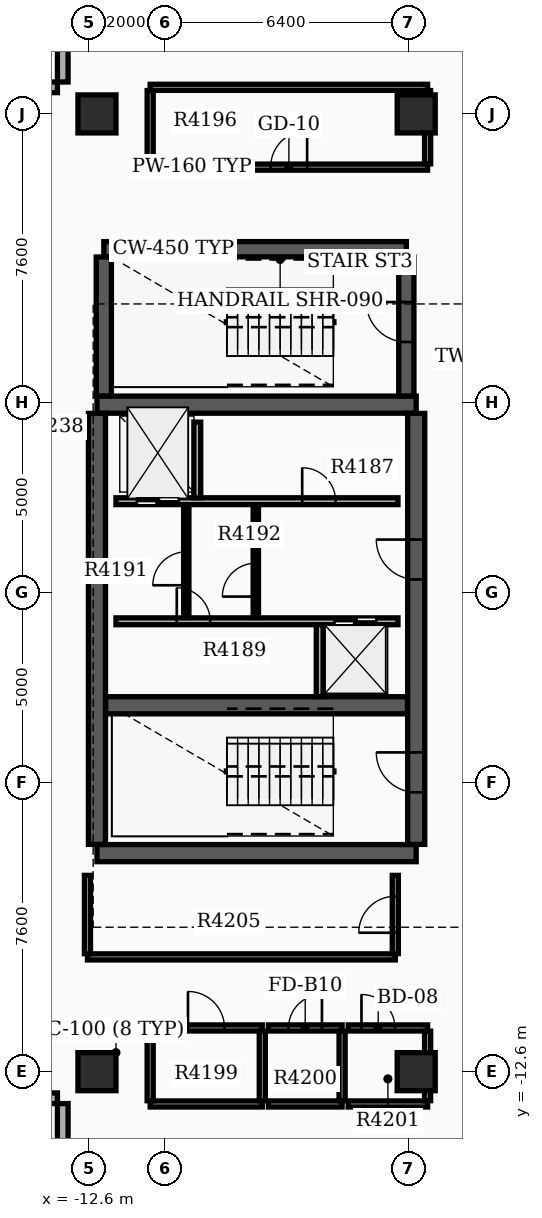
"""IFC4 building model, lengths in metres.
Left out: names, types, materials, properties, quantities, classifications, styles, units other than length and angle.
Written with IfcOpenShell. Run it as: python <this file> out.ifc"""

import sys

from ifc_helpers import new_model, si_unit, direction, frame, frame_2d, origin, origin_2d, place, context, subcontext, project, spatial, rectangle, extrude, element, fill, save


model = new_model("IFC4")
c1 = context("Model", 3, precision=1e-05, world=origin(), true_north=direction((0.0, 1.0)))
c2 = subcontext(c1, "Body", "Model", "MODEL_VIEW")
j1 = project(units=[si_unit("LENGTHUNIT", "METRE"), si_unit("PLANEANGLEUNIT", "RADIAN")], contexts=[c1])
p1 = place(None, origin())
s1 = spatial("IfcSite", under=j1, at=p1, CompositionType="ELEMENT")
p2 = place(p1, origin())
s2 = spatial("IfcBuilding", under=s1, at=p2, CompositionType="ELEMENT")
p3 = place(p2, frame((0.0, 0.0, 265.5)))
s3 = spatial("IfcBuildingStorey", under=s2, at=p3, CompositionType="ELEMENT", Elevation=265.5)
for number, where, z_axis, x_axis in (
    (1, (-12.4, -6.85, 0.0), (0.0, 0.0, 1.0), (1.0, 0.0, 0.0)),
    (2, (-12.4, 4.95, 0.0), (0.0, 0.0, 1.0), (1.0, 0.0, 0.0)),
):
    element("IfcWall", number, at=place(p3, frame(where, z_axis=z_axis, x_axis=x_axis)), inside=s3, PredefinedType="SHEAR", context=c2, shape_type="SweptSolid", body=[
        extrude(rectangle(XDim=8.4, YDim=0.45, at=frame_2d((4.2, 0.0))), origin(), (0.0, 0.0, 1.0), 3.7),
    ])
p4 = place(p3, frame((-12.4, -6.62, 0.0), z_axis=(0.0, 0.0, 1.0), x_axis=(0.0, 1.0, 0.0)))
e3 = element("IfcWall", 3, at=p4, inside=s3, PredefinedType="SHEAR", context=c2, shape_type="SweptSolid", body=[
    extrude(rectangle(XDim=11.34, YDim=0.45, at=frame_2d((5.67, 0.0))), origin(), (0.0, 0.0, 1.0), 3.7),
])
p5 = place(p3, frame((-4.0, -6.62, 0.0), z_axis=(0.0, 0.0, 1.0), x_axis=(0.0, 1.0, 0.0)))
e4 = element("IfcWall", 4, at=p5, inside=s3, PredefinedType="SHEAR", context=c2, shape_type="SweptSolid", body=[
    extrude(rectangle(XDim=11.34, YDim=0.45, at=frame_2d((5.67, 0.0))), origin(), (0.0, 0.0, 1.0), 3.7),
])
p6 = place(p5, frame((1.37, 0.0, 0.0)))
e5 = element("IfcOpeningElement", 5, at=p6, cuts=e4, PredefinedType="OPENING", context=c2, shape_type="SweptSolid", body=[
    extrude(rectangle(XDim=1.05, YDim=2.15, at=frame_2d((0.525, 1.075))), frame((0.0, 0.235, 0.0), z_axis=(0.0, -1.0, 0.0), x_axis=(1.0, 0.0, 0.0)), (0.0, 0.0, 1.0), 0.47),
])
p7 = place(p5, frame((6.97, 0.0, 0.0)))
e6 = element("IfcOpeningElement", 6, at=p7, cuts=e4, PredefinedType="OPENING", context=c2, shape_type="SweptSolid", body=[
    extrude(rectangle(XDim=1.05, YDim=2.15, at=frame_2d((0.525, 1.075))), frame((0.0, 0.235, 0.0), z_axis=(0.0, -1.0, 0.0), x_axis=(1.0, 0.0, 0.0)), (0.0, 0.0, 1.0), 0.47),
])
p8 = place(p3, frame((-12.17, -2.96, 0.0), z_axis=(0.0, 0.0, 1.0), x_axis=(1.0, 0.0, 0.0)))
e7 = element("IfcWall", 7, at=p8, inside=s3, PredefinedType="SHEAR", context=c2, shape_type="SweptSolid", body=[
    extrude(rectangle(XDim=7.94, YDim=0.45, at=frame_2d((3.97, 0.0))), origin(), (0.0, 0.0, 1.0), 3.7),
])
p9 = place(p3, frame((-12.22, 9.04, 0.0), z_axis=(0.0, 0.0, 1.0), x_axis=(1.0, 0.0, 0.0)))
e8 = element("IfcWall", 8, at=p9, inside=s3, PredefinedType="SHEAR", context=c2, shape_type="SweptSolid", body=[
    extrude(rectangle(XDim=7.96, YDim=0.4, at=frame_2d((3.98, 0.0))), origin(), (0.0, 0.0, 1.0), 3.7),
])
p10 = place(p3, frame((-12.22, 5.18, 0.0), z_axis=(0.0, 0.0, 1.0), x_axis=(0.0, 1.0, 0.0)))
e9 = element("IfcWall", 9, at=p10, inside=s3, PredefinedType="SHEAR", context=c2, shape_type="SweptSolid", body=[
    extrude(rectangle(XDim=3.655, YDim=0.4, at=frame_2d((1.828, 0.0))), origin(), (0.0, 0.0, 1.0), 3.7),
])
p11 = place(p3, frame((-4.26, 5.18, 0.0), z_axis=(0.0, 0.0, 1.0), x_axis=(0.0, 1.0, 0.0)))
e10 = element("IfcWall", 10, at=p11, inside=s3, PredefinedType="SHEAR", context=c2, shape_type="SweptSolid", body=[
    extrude(rectangle(XDim=3.655, YDim=0.4, at=frame_2d((1.828, 0.0))), origin(), (0.0, 0.0, 1.0), 3.7),
])
p12 = place(p11, frame((1.42, 0.0, 0.0)))
e11 = element("IfcOpeningElement", 11, at=p12, cuts=e10, PredefinedType="OPENING", context=c2, shape_type="SweptSolid", body=[
    extrude(rectangle(XDim=1.05, YDim=2.15, at=frame_2d((0.525, 1.075))), frame((0.0, 0.21, 0.0), z_axis=(0.0, -1.0, 0.0), x_axis=(1.0, 0.0, 0.0)), (0.0, 0.0, 1.0), 0.42),
])
for number, where, z_axis, x_axis in (
    (12, (-12.4, -12.6, 0.0), (0.0, 0.0, 1.0), (1.0, 0.0, 0.0)),
    (13, (-12.4, 12.6, 0.0), (0.0, 0.0, 1.0), (1.0, 0.0, 0.0)),
    (14, (-4.0, -12.6, 0.0), (0.0, 0.0, 1.0), (1.0, 0.0, 0.0)),
    (15, (-4.0, 12.6, 0.0), (0.0, 0.0, 1.0), (1.0, 0.0, 0.0)),
):
    element("IfcColumn", number, at=place(p3, frame(where, z_axis=z_axis, x_axis=x_axis)), inside=s3, PredefinedType="COLUMN", context=c2, shape_type="SweptSolid", body=[
        extrude(rectangle(XDim=1.0, YDim=1.0, at=origin_2d()), origin(), (0.0, 0.0, 1.0), 3.9),
    ])
p13 = place(p3, frame((-14.66, 13.3, 0.0), z_axis=(0.0, 0.0, 1.0), x_axis=(1.0, 0.0, 0.0)))
e16 = element("IfcWall", 16, at=p13, inside=s3, PredefinedType="STANDARD", context=c2, shape_type="SweptSolid", body=[
    extrude(rectangle(XDim=1.22, YDim=0.28, at=frame_2d((0.61, 0.0))), origin(), (0.0, 0.0, 1.0), 3.18),
])
p14 = place(p3, frame((-13.3, 13.44, 0.0), z_axis=(0.0, 0.0, 1.0), x_axis=(0.0, 1.0, 0.0)))
e17 = element("IfcWall", 17, at=p14, inside=s3, PredefinedType="STANDARD", context=c2, shape_type="SweptSolid", body=[
    extrude(rectangle(XDim=1.5, YDim=0.28, at=frame_2d((0.75, 0.0))), origin(), (0.0, 0.0, 1.0), 3.18),
])
p15 = place(p3, frame((-14.66, -13.3, 0.0), z_axis=(0.0, 0.0, 1.0), x_axis=(1.0, 0.0, 0.0)))
e18 = element("IfcWall", 18, at=p15, inside=s3, PredefinedType="STANDARD", context=c2, shape_type="SweptSolid", body=[
    extrude(rectangle(XDim=1.22, YDim=0.28, at=frame_2d((0.61, 0.0))), origin(), (0.0, 0.0, 1.0), 3.18),
])
p16 = place(p3, frame((-13.3, -13.44, 0.0), z_axis=(0.0, 0.0, 1.0), x_axis=(0.0, -1.0, 0.0)))
e19 = element("IfcWall", 19, at=p16, inside=s3, PredefinedType="STANDARD", context=c2, shape_type="SweptSolid", body=[
    extrude(rectangle(XDim=1.5, YDim=0.28, at=frame_2d((0.75, 0.0))), origin(), (0.0, 0.0, 1.0), 3.18),
])
p17 = place(p3, frame((-11.9, 2.41, 0.0), z_axis=(0.0, 0.0, 1.0), x_axis=(1.0, 0.0, 0.0)))
e20 = element("IfcWall", 20, at=p17, inside=s3, PredefinedType="SOLIDWALL", context=c2, shape_type="SweptSolid", body=[
    extrude(rectangle(XDim=7.42, YDim=0.18, at=frame_2d((3.71, 0.0))), origin(), (0.0, 0.0, 1.0), 3.17),
])
p18 = place(p17, frame((0.55, 0.0, 0.0)))
e21 = element("IfcOpeningElement", 21, at=p18, cuts=e20, PredefinedType="OPENING", context=c2, shape_type="SweptSolid", body=[
    extrude(rectangle(XDim=1.1, YDim=2.15, at=frame_2d((0.55, 1.075))), frame((0.0, 0.1, 0.0), z_axis=(0.0, -1.0, 0.0), x_axis=(1.0, 0.0, 0.0)), (0.0, 0.0, 1.0), 0.2),
])
p19 = place(p17, frame((4.9, 0.0, 0.0)))
e22 = element("IfcOpeningElement", 22, at=p19, cuts=e20, PredefinedType="OPENING", context=c2, shape_type="SweptSolid", body=[
    extrude(rectangle(XDim=0.88, YDim=2.1, at=frame_2d((0.44, 1.05))), frame((0.0, 0.1, 0.0), z_axis=(0.0, -1.0, 0.0), x_axis=(1.0, 0.0, 0.0)), (0.0, 0.0, 1.0), 0.2),
])
p20 = place(p3, frame((-11.9, -0.75, 0.0), z_axis=(0.0, 0.0, 1.0), x_axis=(1.0, 0.0, 0.0)))
e23 = element("IfcWall", 23, at=p20, inside=s3, PredefinedType="SOLIDWALL", context=c2, shape_type="SweptSolid", body=[
    extrude(rectangle(XDim=7.42, YDim=0.18, at=frame_2d((3.71, 0.0))), origin(), (0.0, 0.0, 1.0), 3.17),
])
p21 = place(p20, frame((5.75, 0.0, 0.0)))
e24 = element("IfcOpeningElement", 24, at=p21, cuts=e23, PredefinedType="OPENING", context=c2, shape_type="SweptSolid", body=[
    extrude(rectangle(XDim=1.1, YDim=2.15, at=frame_2d((0.55, 1.075))), frame((0.0, 0.1, 0.0), z_axis=(0.0, -1.0, 0.0), x_axis=(1.0, 0.0, 0.0)), (0.0, 0.0, 1.0), 0.2),
])
p22 = place(p20, frame((1.6, 0.0, 0.0)))
e25 = element("IfcOpeningElement", 25, at=p22, cuts=e23, PredefinedType="OPENING", context=c2, shape_type="SweptSolid", body=[
    extrude(rectangle(XDim=0.88, YDim=2.1, at=frame_2d((0.44, 1.05))), frame((0.0, 0.1, 0.0), z_axis=(0.0, -1.0, 0.0), x_axis=(1.0, 0.0, 0.0)), (0.0, 0.0, 1.0), 0.2),
])
p23 = place(p3, frame((-9.76, 2.5, 0.0), z_axis=(0.0, 0.0, 1.0), x_axis=(0.0, 1.0, 0.0)))
e26 = element("IfcWall", 26, at=p23, inside=s3, PredefinedType="SOLIDWALL", context=c2, shape_type="SweptSolid", body=[
    extrude(rectangle(XDim=1.99, YDim=0.18, at=frame_2d((0.995, 0.0))), origin(), (0.0, 0.0, 1.0), 3.17),
])
p24 = place(p3, frame((-6.54, -2.73, 0.0), z_axis=(0.0, 0.0, 1.0), x_axis=(0.0, 1.0, 0.0)))
e27 = element("IfcWall", 27, at=p24, inside=s3, PredefinedType="SOLIDWALL", context=c2, shape_type="SweptSolid", body=[
    extrude(rectangle(XDim=1.89, YDim=0.18, at=frame_2d((0.945, 0.0))), origin(), (0.0, 0.0, 1.0), 3.17),
])
p25 = place(p3, frame((-8.22, -0.65, 0.0), z_axis=(0.0, 0.0, 1.0), x_axis=(0.0, 1.0, 0.0)))
e28 = element("IfcWall", 28, at=p25, inside=s3, PredefinedType="SOLIDWALL", context=c2, shape_type="SweptSolid", body=[
    extrude(rectangle(XDim=2.96, YDim=0.14, at=frame_2d((1.48, 0.0))), origin(), (0.0, 0.0, 1.0), 3.17),
])
p26 = place(p25, frame((0.55, 0.0, 0.0)))
e29 = element("IfcOpeningElement", 29, at=p26, cuts=e28, PredefinedType="OPENING", context=c2, shape_type="SweptSolid", body=[
    extrude(rectangle(XDim=0.88, YDim=2.1, at=frame_2d((0.44, 1.05))), frame((0.0, 0.08, 0.0), z_axis=(0.0, -1.0, 0.0), x_axis=(1.0, 0.0, 0.0)), (0.0, 0.0, 1.0), 0.16),
])
p27 = place(p3, frame((-10.05, -0.652, 0.0), z_axis=(0.0, 0.0, 1.0), x_axis=(0.0, 1.0, 0.0)))
e30 = element("IfcWall", 30, at=p27, inside=s3, PredefinedType="PARTITIONING", context=c2, shape_type="SweptSolid", body=[
    extrude(rectangle(XDim=2.962, YDim=0.14, at=frame_2d((1.481, 0.0))), origin(), (0.0, 0.0, 1.0), 3.17),
])
p28 = place(p27, frame((0.85, 0.0, 0.0)))
e31 = element("IfcOpeningElement", 31, at=p28, cuts=e30, PredefinedType="OPENING", context=c2, shape_type="SweptSolid", body=[
    extrude(rectangle(XDim=0.88, YDim=2.1, at=frame_2d((0.44, 1.05))), frame((0.0, 0.08, 0.0), z_axis=(0.0, -1.0, 0.0), x_axis=(1.0, 0.0, 0.0)), (0.0, 0.0, 1.0), 0.16),
])
p29 = place(p3, frame((-11.0, 11.2, 0.0), z_axis=(0.0, 0.0, 1.0), x_axis=(1.0, 0.0, 0.0)))
e32 = element("IfcWall", 32, at=p29, inside=s3, PredefinedType="PARTITIONING", context=c2, shape_type="SweptSolid", body=[
    extrude(rectangle(XDim=7.3, YDim=0.16, at=frame_2d((3.65, 0.0))), origin(), (0.0, 0.0, 1.0), 3.17),
])
p30 = place(p29, frame((3.17, 0.0, 0.0)))
e33 = element("IfcOpeningElement", 33, at=p30, cuts=e32, PredefinedType="OPENING", context=c2, shape_type="SweptSolid", body=[
    extrude(rectangle(XDim=0.96, YDim=2.15, at=frame_2d((0.48, 1.075))), frame((0.0, 0.09, 0.0), z_axis=(0.0, -1.0, 0.0), x_axis=(1.0, 0.0, 0.0)), (0.0, 0.0, 1.0), 0.18),
])
p31 = place(p3, frame((-11.0, 13.3, 0.0), z_axis=(0.0, 0.0, 1.0), x_axis=(1.0, 0.0, 0.0)))
e34 = element("IfcWall", 34, at=p31, inside=s3, PredefinedType="PARTITIONING", context=c2, shape_type="SweptSolid", body=[
    extrude(rectangle(XDim=7.3, YDim=0.16, at=frame_2d((3.65, 0.0))), origin(), (0.0, 0.0, 1.0), 3.17),
])
for number, where, z_axis, x_axis in (
    (35, (-11.0, 11.285, 0.0), (0.0, 0.0, 1.0), (0.0, 1.0, 0.0)),
    (36, (-3.7, 11.285, 0.0), (0.0, 0.0, 1.0), (0.0, 1.0, 0.0)),
):
    element("IfcWall", number, at=place(p3, frame(where, z_axis=z_axis, x_axis=x_axis)), inside=s3, PredefinedType="PARTITIONING", context=c2, shape_type="SweptSolid", body=[
        extrude(rectangle(XDim=1.93, YDim=0.16, at=frame_2d((0.965, 0.0))), origin(), (0.0, 0.0, 1.0), 3.17),
    ])
p32 = place(p3, frame((-11.0, -13.45, 0.0), z_axis=(0.0, 0.0, 1.0), x_axis=(1.0, 0.0, 0.0)))
e37 = element("IfcWall", 37, at=p32, inside=s3, PredefinedType="PARTITIONING", context=c2, shape_type="SweptSolid", body=[
    extrude(rectangle(XDim=2.95, YDim=0.16, at=frame_2d((1.475, 0.0))), origin(), (0.0, 0.0, 1.0), 3.17),
])
p33 = place(p3, frame((-11.0, -11.45, 0.0), z_axis=(0.0, 0.0, 1.0), x_axis=(1.0, 0.0, 0.0)))
e38 = element("IfcWall", 38, at=p33, inside=s3, PredefinedType="PARTITIONING", context=c2, shape_type="SweptSolid", body=[
    extrude(rectangle(XDim=2.95, YDim=0.16, at=frame_2d((1.475, 0.0))), origin(), (0.0, 0.0, 1.0), 3.17),
])
p34 = place(p33, frame((0.995, 0.0, 0.0)))
e39 = element("IfcOpeningElement", 39, at=p34, cuts=e38, PredefinedType="OPENING", context=c2, shape_type="SweptSolid", body=[
    extrude(rectangle(XDim=0.96, YDim=2.15, at=frame_2d((0.48, 1.075))), frame((0.0, 0.09, 0.0), z_axis=(0.0, -1.0, 0.0), x_axis=(1.0, 0.0, 0.0)), (0.0, 0.0, 1.0), 0.18),
])
for number, where, z_axis, x_axis in (
    (40, (-11.0, -13.365, 0.0), (0.0, 0.0, 1.0), (0.0, 1.0, 0.0)),
    (41, (-8.05, -13.365, 0.0), (0.0, 0.0, 1.0), (0.0, 1.0, 0.0)),
):
    element("IfcWall", number, at=place(p3, frame(where, z_axis=z_axis, x_axis=x_axis)), inside=s3, PredefinedType="PARTITIONING", context=c2, shape_type="SweptSolid", body=[
        extrude(rectangle(XDim=1.83, YDim=0.16, at=frame_2d((0.915, 0.0))), origin(), (0.0, 0.0, 1.0), 3.17),
    ])
p35 = place(p3, frame((-7.89, -13.45, 0.0), z_axis=(0.0, 0.0, 1.0), x_axis=(1.0, 0.0, 0.0)))
e42 = element("IfcWall", 42, at=p35, inside=s3, PredefinedType="PARTITIONING", context=c2, shape_type="SweptSolid", body=[
    extrude(rectangle(XDim=1.94, YDim=0.16, at=frame_2d((0.97, 0.0))), origin(), (0.0, 0.0, 1.0), 3.17),
])
p36 = place(p3, frame((-7.89, -11.45, 0.0), z_axis=(0.0, 0.0, 1.0), x_axis=(1.0, 0.0, 0.0)))
e43 = element("IfcWall", 43, at=p36, inside=s3, PredefinedType="PARTITIONING", context=c2, shape_type="SweptSolid", body=[
    extrude(rectangle(XDim=1.94, YDim=0.16, at=frame_2d((0.97, 0.0))), origin(), (0.0, 0.0, 1.0), 3.17),
])
p37 = place(p36, frame((0.53, 0.0, 0.0)))
e44 = element("IfcOpeningElement", 44, at=p37, cuts=e43, PredefinedType="OPENING", context=c2, shape_type="SweptSolid", body=[
    extrude(rectangle(XDim=0.88, YDim=2.1, at=frame_2d((0.44, 1.05))), frame((0.0, 0.09, 0.0), z_axis=(0.0, -1.0, 0.0), x_axis=(1.0, 0.0, 0.0)), (0.0, 0.0, 1.0), 0.18),
])
p38 = place(p3, frame((-5.95, -13.365, 0.0), z_axis=(0.0, 0.0, 1.0), x_axis=(0.0, 1.0, 0.0)))
e45 = element("IfcWall", 45, at=p38, inside=s3, PredefinedType="PARTITIONING", context=c2, shape_type="SweptSolid", body=[
    extrude(rectangle(XDim=1.83, YDim=0.16, at=frame_2d((0.915, 0.0))), origin(), (0.0, 0.0, 1.0), 3.17),
])
p39 = place(p3, frame((-5.79, -13.45, 0.0), z_axis=(0.0, 0.0, 1.0), x_axis=(1.0, 0.0, 0.0)))
e46 = element("IfcWall", 46, at=p39, inside=s3, PredefinedType="PARTITIONING", context=c2, shape_type="SweptSolid", body=[
    extrude(rectangle(XDim=2.09, YDim=0.16, at=frame_2d((1.045, 0.0))), origin(), (0.0, 0.0, 1.0), 3.17),
])
p40 = place(p3, frame((-5.79, -11.45, 0.0), z_axis=(0.0, 0.0, 1.0), x_axis=(1.0, 0.0, 0.0)))
e47 = element("IfcWall", 47, at=p40, inside=s3, PredefinedType="PARTITIONING", context=c2, shape_type="SweptSolid", body=[
    extrude(rectangle(XDim=2.09, YDim=0.16, at=frame_2d((1.045, 0.0))), origin(), (0.0, 0.0, 1.0), 3.17),
])
p41 = place(p40, frame((0.35, 0.0, 0.0)))
e48 = element("IfcOpeningElement", 48, at=p41, cuts=e47, PredefinedType="OPENING", context=c2, shape_type="SweptSolid", body=[
    extrude(rectangle(XDim=0.88, YDim=2.15, at=frame_2d((0.44, 1.075))), frame((0.0, 0.09, 0.0), z_axis=(0.0, -1.0, 0.0), x_axis=(1.0, 0.0, 0.0)), (0.0, 0.0, 1.0), 0.18),
])
p42 = place(p3, frame((-3.7, -13.365, 0.0), z_axis=(0.0, 0.0, 1.0), x_axis=(0.0, 1.0, 0.0)))
e49 = element("IfcWall", 49, at=p42, inside=s3, PredefinedType="PARTITIONING", context=c2, shape_type="SweptSolid", body=[
    extrude(rectangle(XDim=1.83, YDim=0.16, at=frame_2d((0.915, 0.0))), origin(), (0.0, 0.0, 1.0), 3.17),
])
p43 = place(p3, frame((-12.65, -9.58, 0.0), z_axis=(0.0, 0.0, 1.0), x_axis=(1.0, 0.0, 0.0)))
e50 = element("IfcWall", 50, at=p43, inside=s3, PredefinedType="PARTITIONING", context=c2, shape_type="SweptSolid", body=[
    extrude(rectangle(XDim=8.1, YDim=0.16, at=frame_2d((4.05, 0.0))), origin(), (0.0, 0.0, 1.0), 3.17),
])
p44 = place(p3, frame((-12.65, -9.495, 0.0), z_axis=(0.0, 0.0, 1.0), x_axis=(0.0, 1.0, 0.0)))
e51 = element("IfcWall", 51, at=p44, inside=s3, PredefinedType="PARTITIONING", context=c2, shape_type="SweptSolid", body=[
    extrude(rectangle(XDim=2.06, YDim=0.16, at=frame_2d((1.03, 0.0))), origin(), (0.0, 0.0, 1.0), 3.17),
])
p45 = place(p3, frame((-4.55, -9.495, 0.0), z_axis=(0.0, 0.0, 1.0), x_axis=(0.0, 1.0, 0.0)))
e52 = element("IfcWall", 52, at=p45, inside=s3, PredefinedType="PARTITIONING", context=c2, shape_type="SweptSolid", body=[
    extrude(rectangle(XDim=2.06, YDim=0.16, at=frame_2d((1.03, 0.0))), origin(), (0.0, 0.0, 1.0), 3.17),
])
p46 = place(p45, frame((0.55, 0.0, 0.0)))
e53 = element("IfcOpeningElement", 53, at=p46, cuts=e52, PredefinedType="OPENING", context=c2, shape_type="SweptSolid", body=[
    extrude(rectangle(XDim=0.96, YDim=2.15, at=frame_2d((0.48, 1.075))), frame((0.0, 0.09, 0.0), z_axis=(0.0, -1.0, 0.0), x_axis=(1.0, 0.0, 0.0)), (0.0, 0.0, 1.0), 0.18),
])
p47 = place(p6, origin())
e54 = element("IfcDoor", 54, at=p47, inside=s3, OperationType="SINGLE_SWING_RIGHT", PredefinedType="DOOR", context=c2, shape_type="SweptSolid", body=[
    extrude(rectangle(XDim=1.05, YDim=2.15, at=frame_2d((0.525, 1.075))), frame((0.0, 0.025, 0.0), z_axis=(0.0, -1.0, 0.0), x_axis=(1.0, 0.0, 0.0)), (0.0, 0.0, 1.0), 0.05),
])
fill(e5, e54)
p48 = place(p7, origin())
e55 = element("IfcDoor", 55, at=p48, inside=s3, OperationType="SINGLE_SWING_RIGHT", PredefinedType="DOOR", context=c2, shape_type="SweptSolid", body=[
    extrude(rectangle(XDim=1.05, YDim=2.15, at=frame_2d((0.525, 1.075))), frame((0.0, 0.025, 0.0), z_axis=(0.0, -1.0, 0.0), x_axis=(1.0, 0.0, 0.0)), (0.0, 0.0, 1.0), 0.05),
])
fill(e6, e55)
p49 = place(p12, origin())
e56 = element("IfcDoor", 56, at=p49, inside=s3, OperationType="SINGLE_SWING_RIGHT", PredefinedType="DOOR", context=c2, shape_type="SweptSolid", body=[
    extrude(rectangle(XDim=1.05, YDim=2.15, at=frame_2d((0.525, 1.075))), frame((0.0, 0.025, 0.0), z_axis=(0.0, -1.0, 0.0), x_axis=(1.0, 0.0, 0.0)), (0.0, 0.0, 1.0), 0.05),
])
fill(e11, e56)
p50 = place(p18, origin())
e57 = element("IfcDoor", 57, at=p50, inside=s3, OperationType="DOUBLE_DOOR_SLIDING", PredefinedType="DOOR", context=c2, shape_type="SweptSolid", body=[
    extrude(rectangle(XDim=1.1, YDim=2.15, at=frame_2d((0.55, 1.075))), frame((0.0, 0.025, 0.0), z_axis=(0.0, -1.0, 0.0), x_axis=(1.0, 0.0, 0.0)), (0.0, 0.0, 1.0), 0.05),
])
fill(e21, e57)
p51 = place(p21, origin())
e58 = element("IfcDoor", 58, at=p51, inside=s3, OperationType="DOUBLE_DOOR_SLIDING", PredefinedType="DOOR", context=c2, shape_type="SweptSolid", body=[
    extrude(rectangle(XDim=1.1, YDim=2.15, at=frame_2d((0.55, 1.075))), frame((0.0, 0.025, 0.0), z_axis=(0.0, -1.0, 0.0), x_axis=(1.0, 0.0, 0.0)), (0.0, 0.0, 1.0), 0.05),
])
fill(e24, e58)
p52 = place(p19, origin())
e59 = element("IfcDoor", 59, at=p52, inside=s3, OperationType="SINGLE_SWING_LEFT", PredefinedType="DOOR", context=c2, shape_type="SweptSolid", body=[
    extrude(rectangle(XDim=0.88, YDim=2.1, at=frame_2d((0.44, 1.05))), frame((0.0, 0.025, 0.0), z_axis=(0.0, -1.0, 0.0), x_axis=(1.0, 0.0, 0.0)), (0.0, 0.0, 1.0), 0.05),
])
fill(e22, e59)
p53 = place(p22, origin())
e60 = element("IfcDoor", 60, at=p53, inside=s3, OperationType="SINGLE_SWING_LEFT", PredefinedType="DOOR", context=c2, shape_type="SweptSolid", body=[
    extrude(rectangle(XDim=0.88, YDim=2.1, at=frame_2d((0.44, 1.05))), frame((0.0, 0.025, 0.0), z_axis=(0.0, -1.0, 0.0), x_axis=(1.0, 0.0, 0.0)), (0.0, 0.0, 1.0), 0.05),
])
fill(e25, e60)
p54 = place(p26, origin())
e61 = element("IfcDoor", 61, at=p54, inside=s3, OperationType="SINGLE_SWING_LEFT", PredefinedType="DOOR", context=c2, shape_type="SweptSolid", body=[
    extrude(rectangle(XDim=0.88, YDim=2.1, at=frame_2d((0.44, 1.05))), frame((0.0, 0.025, 0.0), z_axis=(0.0, -1.0, 0.0), x_axis=(1.0, 0.0, 0.0)), (0.0, 0.0, 1.0), 0.05),
])
fill(e29, e61)
p55 = place(p28, origin())
e62 = element("IfcDoor", 62, at=p55, inside=s3, OperationType="SINGLE_SWING_LEFT", PredefinedType="DOOR", context=c2, shape_type="SweptSolid", body=[
    extrude(rectangle(XDim=0.88, YDim=2.1, at=frame_2d((0.44, 1.05))), frame((0.0, 0.025, 0.0), z_axis=(0.0, -1.0, 0.0), x_axis=(1.0, 0.0, 0.0)), (0.0, 0.0, 1.0), 0.05),
])
fill(e31, e62)
p56 = place(p30, origin())
e63 = element("IfcDoor", 63, at=p56, inside=s3, OperationType="SINGLE_SWING_RIGHT", PredefinedType="DOOR", context=c2, shape_type="SweptSolid", body=[
    extrude(rectangle(XDim=0.96, YDim=2.15, at=frame_2d((0.48, 1.075))), frame((0.0, 0.025, 0.0), z_axis=(0.0, -1.0, 0.0), x_axis=(1.0, 0.0, 0.0)), (0.0, 0.0, 1.0), 0.05),
])
fill(e33, e63)
p57 = place(p34, origin())
e64 = element("IfcDoor", 64, at=p57, inside=s3, OperationType="SINGLE_SWING_LEFT", PredefinedType="DOOR", context=c2, shape_type="SweptSolid", body=[
    extrude(rectangle(XDim=0.96, YDim=2.15, at=frame_2d((0.48, 1.075))), frame((0.0, 0.025, 0.0), z_axis=(0.0, -1.0, 0.0), x_axis=(1.0, 0.0, 0.0)), (0.0, 0.0, 1.0), 0.05),
])
fill(e39, e64)
p58 = place(p37, origin())
e65 = element("IfcDoor", 65, at=p58, inside=s3, OperationType="SINGLE_SWING_RIGHT", PredefinedType="DOOR", context=c2, shape_type="SweptSolid", body=[
    extrude(rectangle(XDim=0.88, YDim=2.1, at=frame_2d((0.44, 1.05))), frame((0.0, 0.025, 0.0), z_axis=(0.0, -1.0, 0.0), x_axis=(1.0, 0.0, 0.0)), (0.0, 0.0, 1.0), 0.05),
])
fill(e44, e65)
p59 = place(p41, origin())
e66 = element("IfcDoor", 66, at=p59, inside=s3, OperationType="SINGLE_SWING_LEFT", PredefinedType="DOOR", context=c2, shape_type="SweptSolid", body=[
    extrude(rectangle(XDim=0.88, YDim=2.15, at=frame_2d((0.44, 1.075))), frame((0.0, 0.025, 0.0), z_axis=(0.0, -1.0, 0.0), x_axis=(1.0, 0.0, 0.0)), (0.0, 0.0, 1.0), 0.05),
])
fill(e48, e66)
p60 = place(p46, origin())
e67 = element("IfcDoor", 67, at=p60, inside=s3, OperationType="SINGLE_SWING_LEFT", PredefinedType="DOOR", context=c2, shape_type="SweptSolid", body=[
    extrude(rectangle(XDim=0.96, YDim=2.15, at=frame_2d((0.48, 1.075))), frame((0.0, 0.025, 0.0), z_axis=(0.0, -1.0, 0.0), x_axis=(1.0, 0.0, 0.0)), (0.0, 0.0, 1.0), 0.05),
])
fill(e53, e67)
save(model, sys.argv[1])
